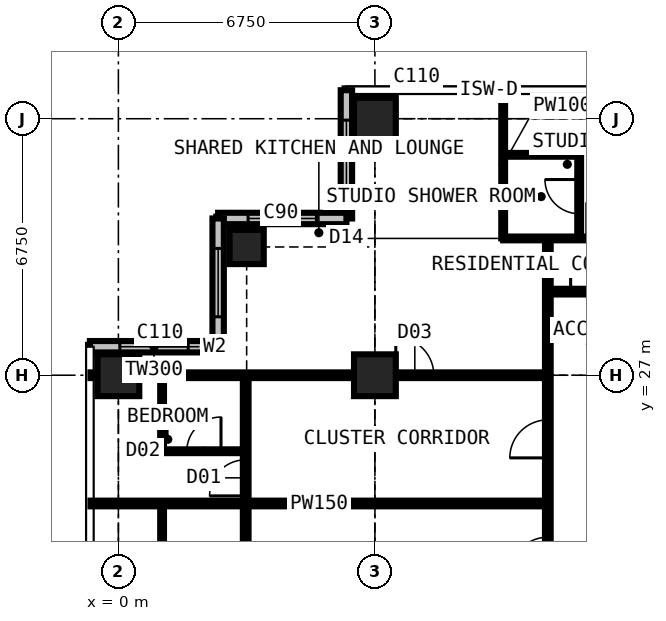
"""IFC4 building model, lengths in metres.
Left out: names, types, materials, properties, quantities, classifications, styles, units other than length and angle.
Written with IfcOpenShell. Run it as: python <this file> out.ifc"""

import sys

from ifc_helpers import new_model, si_unit, direction, frame, frame_2d, origin, origin_2d, place, context, subcontext, project, spatial, rectangle, extrude, element, fill, save


model = new_model("IFC4")
c1 = context("Model", 3, precision=1e-05, world=origin(), true_north=direction((0.0, 1.0)))
c2 = subcontext(c1, "Body", "Model", "MODEL_VIEW")
j1 = project(units=[si_unit("LENGTHUNIT", "METRE"), si_unit("PLANEANGLEUNIT", "RADIAN")], contexts=[c1])
p1 = place(None, origin())
s1 = spatial("IfcSite", under=j1, at=p1, CompositionType="ELEMENT")
p2 = place(p1, origin())
s2 = spatial("IfcBuilding", under=s1, at=p2, CompositionType="ELEMENT")
p3 = place(p2, frame((0.0, 0.0, 218.7)))
s3 = spatial("IfcBuildingStorey", under=s2, at=p3, CompositionType="ELEMENT", Elevation=218.7)
p4 = place(p3, frame((0.0, 27.0, 0.0), z_axis=(0.0, 0.0, 1.0), x_axis=(1.0, 0.0, 0.0)))
e1 = element("IfcColumn", 1, at=p4, inside=s3, PredefinedType="COLUMN", context=c2, shape_type="SweptSolid", body=[
    extrude(rectangle(XDim=1.1, YDim=1.1, at=origin_2d()), origin(), (0.0, 0.0, 1.0), 3.6),
])
p5 = place(p3, frame((3.375, 30.375, 0.0), z_axis=(0.0, 0.0, 1.0), x_axis=(1.0, 0.0, 0.0)))
e2 = element("IfcColumn", 2, at=p5, inside=s3, PredefinedType="COLUMN", context=c2, shape_type="SweptSolid", body=[
    extrude(rectangle(XDim=0.9, YDim=0.9, at=origin_2d()), origin(), (0.0, 0.0, 1.0), 3.6),
])
for number, where, z_axis, x_axis in (
    (3, (6.75, 27.0, 0.0), (0.0, 0.0, 1.0), (1.0, 0.0, 0.0)),
    (4, (6.75, 33.75, 0.0), (0.0, 0.0, 1.0), (1.0, 0.0, 0.0)),
):
    element("IfcColumn", number, at=place(p3, frame(where, z_axis=z_axis, x_axis=x_axis)), inside=s3, PredefinedType="COLUMN", context=c2, shape_type="SweptSolid", body=[
        extrude(rectangle(XDim=1.1, YDim=1.1, at=origin_2d()), origin(), (0.0, 0.0, 1.0), 3.6),
    ])
p6 = place(p3, frame((6.0, 34.5, 0.0), z_axis=(0.0, 0.0, 1.0), x_axis=(0.0, -1.0, 0.0)))
e5 = element("IfcWall", 5, at=p6, inside=s3, PredefinedType="SOLIDWALL", context=c2, shape_type="SweptSolid", body=[
    extrude(rectangle(XDim=3.375, YDim=0.3, at=frame_2d((1.688, 0.0))), origin(), (0.0, 0.0, 1.0), 3.375),
])
p7 = place(p6, frame((0.788, 0.0, 0.6)))
e6 = element("IfcOpeningElement", 6, at=p7, cuts=e5, PredefinedType="OPENING", context=c2, shape_type="SweptSolid", body=[
    extrude(rectangle(XDim=1.8, YDim=2.1, at=frame_2d((0.9, 1.05))), frame((0.0, 0.16, 0.0), z_axis=(0.0, -1.0, 0.0), x_axis=(1.0, 0.0, 0.0)), (0.0, 0.0, 1.0), 0.32),
])
p8 = place(p3, frame((6.0, 31.125, 0.0), z_axis=(0.0, 0.0, 1.0), x_axis=(-1.0, 0.0, 0.0)))
e7 = element("IfcWall", 7, at=p8, inside=s3, PredefinedType="SOLIDWALL", context=c2, shape_type="SweptSolid", body=[
    extrude(rectangle(XDim=3.375, YDim=0.3, at=frame_2d((1.688, 0.0))), origin(), (0.0, 0.0, 1.0), 3.375),
])
p9 = place(p8, frame((0.788, 0.0, 0.6)))
e8 = element("IfcOpeningElement", 8, at=p9, cuts=e7, PredefinedType="OPENING", context=c2, shape_type="SweptSolid", body=[
    extrude(rectangle(XDim=1.8, YDim=2.1, at=frame_2d((0.9, 1.05))), frame((0.0, 0.16, 0.0), z_axis=(0.0, -1.0, 0.0), x_axis=(1.0, 0.0, 0.0)), (0.0, 0.0, 1.0), 0.32),
])
p10 = place(p3, frame((2.625, 31.125, 0.0), z_axis=(0.0, 0.0, 1.0), x_axis=(0.0, -1.0, 0.0)))
e9 = element("IfcWall", 9, at=p10, inside=s3, PredefinedType="SOLIDWALL", context=c2, shape_type="SweptSolid", body=[
    extrude(rectangle(XDim=3.375, YDim=0.3, at=frame_2d((1.688, 0.0))), origin(), (0.0, 0.0, 1.0), 3.375),
])
p11 = place(p10, frame((0.788, 0.0, 0.6)))
e10 = element("IfcOpeningElement", 10, at=p11, cuts=e9, PredefinedType="OPENING", context=c2, shape_type="SweptSolid", body=[
    extrude(rectangle(XDim=1.8, YDim=2.1, at=frame_2d((0.9, 1.05))), frame((0.0, 0.16, 0.0), z_axis=(0.0, -1.0, 0.0), x_axis=(1.0, 0.0, 0.0)), (0.0, 0.0, 1.0), 0.32),
])
p12 = place(p3, frame((2.625, 27.75, 0.0), z_axis=(0.0, 0.0, 1.0), x_axis=(-1.0, 0.0, 0.0)))
e11 = element("IfcWall", 11, at=p12, inside=s3, PredefinedType="SOLIDWALL", context=c2, shape_type="SweptSolid", body=[
    extrude(rectangle(XDim=3.375, YDim=0.3, at=frame_2d((1.688, 0.0))), origin(), (0.0, 0.0, 1.0), 3.375),
])
p13 = place(p12, frame((0.788, 0.0, 0.6)))
e12 = element("IfcOpeningElement", 12, at=p13, cuts=e11, PredefinedType="OPENING", context=c2, shape_type="SweptSolid", body=[
    extrude(rectangle(XDim=1.8, YDim=2.1, at=frame_2d((0.9, 1.05))), frame((0.0, 0.16, 0.0), z_axis=(0.0, -1.0, 0.0), x_axis=(1.0, 0.0, 0.0)), (0.0, 0.0, 1.0), 0.32),
])
p14 = place(p3, frame((-0.734, 23.625, 0.0), z_axis=(0.0, 0.0, 1.0), x_axis=(1.0, 0.0, 0.0)))
e13 = element("IfcWall", 13, at=p14, inside=s3, PredefinedType="PARTITIONING", context=c2, shape_type="SweptSolid", body=[
    extrude(rectangle(XDim=12.034, YDim=0.15, at=frame_2d((6.017, 0.0))), origin(), (0.0, 0.0, 1.0), 3.375),
])
p15 = place(p3, frame((-0.734, 27.0, 0.0), z_axis=(0.0, 0.0, 1.0), x_axis=(1.0, 0.0, 0.0)))
e14 = element("IfcWall", 14, at=p15, inside=s3, PredefinedType="PARTITIONING", context=c2, shape_type="SweptSolid", body=[
    extrude(rectangle(XDim=12.034, YDim=0.15, at=frame_2d((6.017, 0.0))), origin(), (0.0, 0.0, 1.0), 2.877),
])
p16 = place(p15, frame((8.034, 0.0, 0.0)))
e15 = element("IfcOpeningElement", 15, at=p16, cuts=e14, PredefinedType="OPENING", context=c2, shape_type="SweptSolid", body=[
    extrude(rectangle(XDim=1.0, YDim=2.2, at=frame_2d((0.5, 1.1))), frame((0.0, 0.085, 0.0), z_axis=(0.0, -1.0, 0.0), x_axis=(1.0, 0.0, 0.0)), (0.0, 0.0, 1.0), 0.17),
])
for number, where, z_axis, x_axis in (
    (16, (1.15, 21.625, 0.0), (0.0, 0.0, 1.0), (0.0, 1.0, 0.0)),
    (17, (1.15, 25.0, 0.0), (0.0, 0.0, 1.0), (0.0, 1.0, 0.0)),
):
    element("IfcWall", number, at=place(p3, frame(where, z_axis=z_axis, x_axis=x_axis)), inside=s3, PredefinedType="PARTITIONING", context=c2, shape_type="SweptSolid", body=[
        extrude(rectangle(XDim=2.0, YDim=0.1, at=frame_2d((1.0, 0.0))), origin(), (0.0, 0.0, 1.0), 3.375),
    ])
p17 = place(p3, frame((1.15, 25.0, 0.0), z_axis=(0.0, 0.0, 1.0), x_axis=(1.0, 0.0, 0.0)))
e18 = element("IfcWall", 18, at=p17, inside=s3, PredefinedType="PARTITIONING", context=c2, shape_type="SweptSolid", body=[
    extrude(rectangle(XDim=2.2, YDim=0.1, at=frame_2d((1.1, 0.0))), origin(), (0.0, 0.0, 1.0), 3.375),
])
p18 = place(p17, frame((0.65, 0.0, 0.0)))
e19 = element("IfcOpeningElement", 19, at=p18, cuts=e18, PredefinedType="OPENING", context=c2, shape_type="SweptSolid", body=[
    extrude(rectangle(XDim=0.9, YDim=2.2, at=frame_2d((0.45, 1.1))), frame((0.0, 0.06, 0.0), z_axis=(0.0, -1.0, 0.0), x_axis=(1.0, 0.0, 0.0)), (0.0, 0.0, 1.0), 0.12),
])
p19 = place(p3, frame((3.35, 13.5, 0.0), z_axis=(0.0, 0.0, 1.0), x_axis=(0.0, 1.0, 0.0)))
e20 = element("IfcWall", 20, at=p19, inside=s3, PredefinedType="PARTITIONING", context=c2, shape_type="SweptSolid", body=[
    extrude(rectangle(XDim=13.5, YDim=0.15, at=frame_2d((6.75, 0.0))), origin(), (0.0, 0.0, 1.0), 3.375),
])
p20 = place(p19, frame((10.325, 0.0, 0.0)))
e21 = element("IfcOpeningElement", 21, at=p20, cuts=e20, PredefinedType="OPENING", context=c2, shape_type="SweptSolid", body=[
    extrude(rectangle(XDim=0.95, YDim=2.2, at=frame_2d((0.475, 1.1))), frame((0.0, 0.085, 0.0), z_axis=(0.0, -1.0, 0.0), x_axis=(1.0, 0.0, 0.0)), (0.0, 0.0, 1.0), 0.17),
])
p21 = place(p19, frame((0.25, 0.0, 0.0)))
e22 = element("IfcOpeningElement", 22, at=p21, cuts=e20, PredefinedType="OPENING", context=c2, shape_type="SweptSolid", body=[
    extrude(rectangle(XDim=0.95, YDim=2.2, at=frame_2d((0.475, 1.1))), frame((0.0, 0.085, 0.0), z_axis=(0.0, -1.0, 0.0), x_axis=(1.0, 0.0, 0.0)), (0.0, 0.0, 1.0), 0.17),
])
p22 = place(p19, frame((3.575, 0.0, 0.0)))
e23 = element("IfcOpeningElement", 23, at=p22, cuts=e20, PredefinedType="OPENING", context=c2, shape_type="SweptSolid", body=[
    extrude(rectangle(XDim=0.95, YDim=2.2, at=frame_2d((0.475, 1.1))), frame((0.0, 0.085, 0.0), z_axis=(0.0, -1.0, 0.0), x_axis=(1.0, 0.0, 0.0)), (0.0, 0.0, 1.0), 0.17),
])
p23 = place(p19, frame((6.95, 0.0, 0.0)))
e24 = element("IfcOpeningElement", 24, at=p23, cuts=e20, PredefinedType="OPENING", context=c2, shape_type="SweptSolid", body=[
    extrude(rectangle(XDim=0.95, YDim=2.2, at=frame_2d((0.475, 1.1))), frame((0.0, 0.085, 0.0), z_axis=(0.0, -1.0, 0.0), x_axis=(1.0, 0.0, 0.0)), (0.0, 0.0, 1.0), 0.17),
])
p24 = place(p3, frame((10.125, 30.6, 0.0), z_axis=(0.0, 0.0, 1.0), x_axis=(0.0, 1.0, 0.0)))
e25 = element("IfcWall", 25, at=p24, inside=s3, PredefinedType="PARTITIONING", context=c2, shape_type="SweptSolid", body=[
    extrude(rectangle(XDim=3.884, YDim=0.1, at=frame_2d((1.942, 0.0))), origin(), (0.0, 0.0, 1.0), 3.375),
])
p25 = place(p3, frame((10.125, 30.6, 0.0), z_axis=(0.0, 0.0, 1.0), x_axis=(1.0, 0.0, 0.0)))
e26 = element("IfcWall", 26, at=p25, inside=s3, PredefinedType="PARTITIONING", context=c2, shape_type="SweptSolid", body=[
    extrude(rectangle(XDim=3.375, YDim=0.1, at=frame_2d((1.688, 0.0))), origin(), (0.0, 0.0, 1.0), 3.375),
])
p26 = place(p25, frame((2.2, 0.0, 0.0)))
e27 = element("IfcOpeningElement", 27, at=p26, cuts=e26, PredefinedType="OPENING", context=c2, shape_type="SweptSolid", body=[
    extrude(rectangle(XDim=0.95, YDim=2.2, at=frame_2d((0.475, 1.1))), frame((0.0, 0.06, 0.0), z_axis=(0.0, -1.0, 0.0), x_axis=(1.0, 0.0, 0.0)), (0.0, 0.0, 1.0), 0.12),
])
p27 = place(p3, frame((10.125, 32.8, 0.0), z_axis=(0.0, 0.0, 1.0), x_axis=(1.0, 0.0, 0.0)))
e28 = element("IfcWall", 28, at=p27, inside=s3, PredefinedType="PARTITIONING", context=c2, shape_type="SweptSolid", body=[
    extrude(rectangle(XDim=2.0, YDim=0.1, at=frame_2d((1.0, 0.0))), origin(), (0.0, 0.0, 1.0), 3.375),
])
p28 = place(p3, frame((11.3, 11.3, 0.0), z_axis=(0.0, 0.0, 1.0), x_axis=(0.0, 1.0, 0.0)))
e29 = element("IfcWall", 29, at=p28, inside=s3, PredefinedType="PARTITIONING", context=c2, shape_type="SweptSolid", body=[
    extrude(rectangle(XDim=19.3, YDim=0.15, at=frame_2d((9.65, 0.0))), origin(), (0.0, 0.0, 1.0), 3.375),
])
p29 = place(p28, frame((13.525, 0.0, 0.0)))
e30 = element("IfcOpeningElement", 30, at=p29, cuts=e29, PredefinedType="OPENING", context=c2, shape_type="SweptSolid", body=[
    extrude(rectangle(XDim=1.0, YDim=2.2, at=frame_2d((0.5, 1.1))), frame((0.0, 0.085, 0.0), z_axis=(0.0, -1.0, 0.0), x_axis=(1.0, 0.0, 0.0)), (0.0, 0.0, 1.0), 0.17),
])
p30 = place(p28, frame((10.438, 0.0, 0.0)))
e31 = element("IfcOpeningElement", 31, at=p30, cuts=e29, PredefinedType="OPENING", context=c2, shape_type="SweptSolid", body=[
    extrude(rectangle(XDim=1.0, YDim=2.2, at=frame_2d((0.5, 1.1))), frame((0.0, 0.085, 0.0), z_axis=(0.0, -1.0, 0.0), x_axis=(1.0, 0.0, 0.0)), (0.0, 0.0, 1.0), 0.17),
])
p31 = place(p3, frame((11.3, 29.2, 0.0), z_axis=(0.0, 0.0, 1.0), x_axis=(1.0, 0.0, 0.0)))
e32 = element("IfcWall", 32, at=p31, inside=s3, PredefinedType="PARTITIONING", context=c2, shape_type="SweptSolid", body=[
    extrude(rectangle(XDim=19.809, YDim=0.15, at=frame_2d((9.904, 0.0))), origin(), (0.0, 0.0, 1.0), 3.375),
])
p32 = place(p31, frame((14.625, 0.0, 0.0)))
e33 = element("IfcOpeningElement", 33, at=p32, cuts=e32, PredefinedType="OPENING", context=c2, shape_type="SweptSolid", body=[
    extrude(rectangle(XDim=1.0, YDim=2.2, at=frame_2d((0.5, 1.1))), frame((0.0, 0.085, 0.0), z_axis=(0.0, -1.0, 0.0), x_axis=(1.0, 0.0, 0.0)), (0.0, 0.0, 1.0), 0.17),
])
p33 = place(p31, frame((6.4, 0.0, 0.0)))
e34 = element("IfcOpeningElement", 34, at=p33, cuts=e32, PredefinedType="OPENING", context=c2, shape_type="SweptSolid", body=[
    extrude(rectangle(XDim=0.95, YDim=2.2, at=frame_2d((0.475, 1.1))), frame((0.0, 0.085, 0.0), z_axis=(0.0, -1.0, 0.0), x_axis=(1.0, 0.0, 0.0)), (0.0, 0.0, 1.0), 0.17),
])
p34 = place(p31, frame((9.2, 0.0, 0.0)))
e35 = element("IfcOpeningElement", 35, at=p34, cuts=e32, PredefinedType="OPENING", context=c2, shape_type="SweptSolid", body=[
    extrude(rectangle(XDim=0.95, YDim=2.2, at=frame_2d((0.475, 1.1))), frame((0.0, 0.085, 0.0), z_axis=(0.0, -1.0, 0.0), x_axis=(1.0, 0.0, 0.0)), (0.0, 0.0, 1.0), 0.17),
])
p35 = place(p31, frame((0.6, 0.0, 0.0)))
e36 = element("IfcOpeningElement", 36, at=p35, cuts=e32, PredefinedType="OPENING", context=c2, shape_type="SweptSolid", body=[
    extrude(rectangle(XDim=1.0, YDim=2.2, at=frame_2d((0.5, 1.1))), frame((0.0, 0.085, 0.0), z_axis=(0.0, -1.0, 0.0), x_axis=(1.0, 0.0, 0.0)), (0.0, 0.0, 1.0), 0.17),
])
p36 = place(p3, frame((12.125, 30.6, 0.0), z_axis=(0.0, 0.0, 1.0), x_axis=(0.0, 1.0, 0.0)))
e37 = element("IfcWall", 37, at=p36, inside=s3, PredefinedType="PARTITIONING", context=c2, shape_type="SweptSolid", body=[
    extrude(rectangle(XDim=2.2, YDim=0.1, at=frame_2d((1.1, 0.0))), origin(), (0.0, 0.0, 1.0), 3.375),
])
p37 = place(p36, frame((0.65, 0.0, 0.0)))
e38 = element("IfcOpeningElement", 38, at=p37, cuts=e37, PredefinedType="OPENING", context=c2, shape_type="SweptSolid", body=[
    extrude(rectangle(XDim=0.9, YDim=2.2, at=frame_2d((0.45, 1.1))), frame((0.0, 0.06, 0.0), z_axis=(0.0, -1.0, 0.0), x_axis=(1.0, 0.0, 0.0)), (0.0, 0.0, 1.0), 0.12),
])
p38 = place(p7, origin())
e39 = element("IfcWindow", 39, at=p38, inside=s3, PartitioningType="SINGLE_PANEL", PredefinedType="WINDOW", context=c2, shape_type="SweptSolid", body=[
    extrude(rectangle(XDim=1.8, YDim=2.1, at=frame_2d((0.9, 1.05))), frame((0.0, 0.03, 0.0), z_axis=(0.0, -1.0, 0.0), x_axis=(1.0, 0.0, 0.0)), (0.0, 0.0, 1.0), 0.06),
])
fill(e6, e39)
p39 = place(p9, origin())
e40 = element("IfcWindow", 40, at=p39, inside=s3, PartitioningType="SINGLE_PANEL", PredefinedType="WINDOW", context=c2, shape_type="SweptSolid", body=[
    extrude(rectangle(XDim=1.8, YDim=2.1, at=frame_2d((0.9, 1.05))), frame((0.0, 0.03, 0.0), z_axis=(0.0, -1.0, 0.0), x_axis=(1.0, 0.0, 0.0)), (0.0, 0.0, 1.0), 0.06),
])
fill(e8, e40)
p40 = place(p11, origin())
e41 = element("IfcWindow", 41, at=p40, inside=s3, PartitioningType="SINGLE_PANEL", PredefinedType="WINDOW", context=c2, shape_type="SweptSolid", body=[
    extrude(rectangle(XDim=1.8, YDim=2.1, at=frame_2d((0.9, 1.05))), frame((0.0, 0.03, 0.0), z_axis=(0.0, -1.0, 0.0), x_axis=(1.0, 0.0, 0.0)), (0.0, 0.0, 1.0), 0.06),
])
fill(e10, e41)
p41 = place(p13, origin())
e42 = element("IfcWindow", 42, at=p41, inside=s3, PartitioningType="SINGLE_PANEL", PredefinedType="WINDOW", context=c2, shape_type="SweptSolid", body=[
    extrude(rectangle(XDim=1.8, YDim=2.1, at=frame_2d((0.9, 1.05))), frame((0.0, 0.03, 0.0), z_axis=(0.0, -1.0, 0.0), x_axis=(1.0, 0.0, 0.0)), (0.0, 0.0, 1.0), 0.06),
])
fill(e12, e42)
p42 = place(p37, origin())
e43 = element("IfcDoor", 43, at=p42, inside=s3, OperationType="SINGLE_SWING_RIGHT", PredefinedType="DOOR", context=c2, shape_type="SweptSolid", body=[
    extrude(rectangle(XDim=0.9, YDim=2.2, at=frame_2d((0.45, 1.1))), frame((0.0, 0.025, 0.0), z_axis=(0.0, -1.0, 0.0), x_axis=(1.0, 0.0, 0.0)), (0.0, 0.0, 1.0), 0.05),
])
fill(e38, e43)
p43 = place(p35, origin())
e44 = element("IfcDoor", 44, at=p43, inside=s3, OperationType="SINGLE_SWING_LEFT", PredefinedType="DOOR", context=c2, shape_type="SweptSolid", body=[
    extrude(rectangle(XDim=1.0, YDim=2.2, at=frame_2d((0.5, 1.1))), frame((0.0, 0.025, 0.0), z_axis=(0.0, -1.0, 0.0), x_axis=(1.0, 0.0, 0.0)), (0.0, 0.0, 1.0), 0.05),
])
fill(e36, e44)
p44 = place(p16, origin())
e45 = element("IfcDoor", 45, at=p44, inside=s3, OperationType="SINGLE_SWING_LEFT", PredefinedType="DOOR", context=c2, shape_type="SweptSolid", body=[
    extrude(rectangle(XDim=1.0, YDim=2.2, at=frame_2d((0.5, 1.1))), frame((0.0, 0.025, 0.0), z_axis=(0.0, -1.0, 0.0), x_axis=(1.0, 0.0, 0.0)), (0.0, 0.0, 1.0), 0.05),
])
fill(e15, e45)
p45 = place(p20, origin())
e46 = element("IfcDoor", 46, at=p45, inside=s3, OperationType="SINGLE_SWING_LEFT", PredefinedType="DOOR", context=c2, shape_type="SweptSolid", body=[
    extrude(rectangle(XDim=0.95, YDim=2.2, at=frame_2d((0.475, 1.1))), frame((0.0, 0.025, 0.0), z_axis=(0.0, -1.0, 0.0), x_axis=(1.0, 0.0, 0.0)), (0.0, 0.0, 1.0), 0.05),
])
fill(e21, e46)
p46 = place(p18, origin())
e47 = element("IfcDoor", 47, at=p46, inside=s3, OperationType="SINGLE_SWING_RIGHT", PredefinedType="DOOR", context=c2, shape_type="SweptSolid", body=[
    extrude(rectangle(XDim=0.9, YDim=2.2, at=frame_2d((0.45, 1.1))), frame((0.0, 0.025, 0.0), z_axis=(0.0, -1.0, 0.0), x_axis=(1.0, 0.0, 0.0)), (0.0, 0.0, 1.0), 0.05),
])
fill(e19, e47)
p47 = place(p29, origin())
e48 = element("IfcDoor", 48, at=p47, inside=s3, OperationType="SINGLE_SWING_LEFT", PredefinedType="DOOR", context=c2, shape_type="SweptSolid", body=[
    extrude(rectangle(XDim=1.0, YDim=2.2, at=frame_2d((0.5, 1.1))), frame((0.0, 0.025, 0.0), z_axis=(0.0, -1.0, 0.0), x_axis=(1.0, 0.0, 0.0)), (0.0, 0.0, 1.0), 0.05),
])
fill(e30, e48)
p48 = place(p30, origin())
e49 = element("IfcDoor", 49, at=p48, inside=s3, OperationType="SINGLE_SWING_LEFT", PredefinedType="DOOR", context=c2, shape_type="SweptSolid", body=[
    extrude(rectangle(XDim=1.0, YDim=2.2, at=frame_2d((0.5, 1.1))), frame((0.0, 0.025, 0.0), z_axis=(0.0, -1.0, 0.0), x_axis=(1.0, 0.0, 0.0)), (0.0, 0.0, 1.0), 0.05),
])
fill(e31, e49)
save(model, sys.argv[1])
